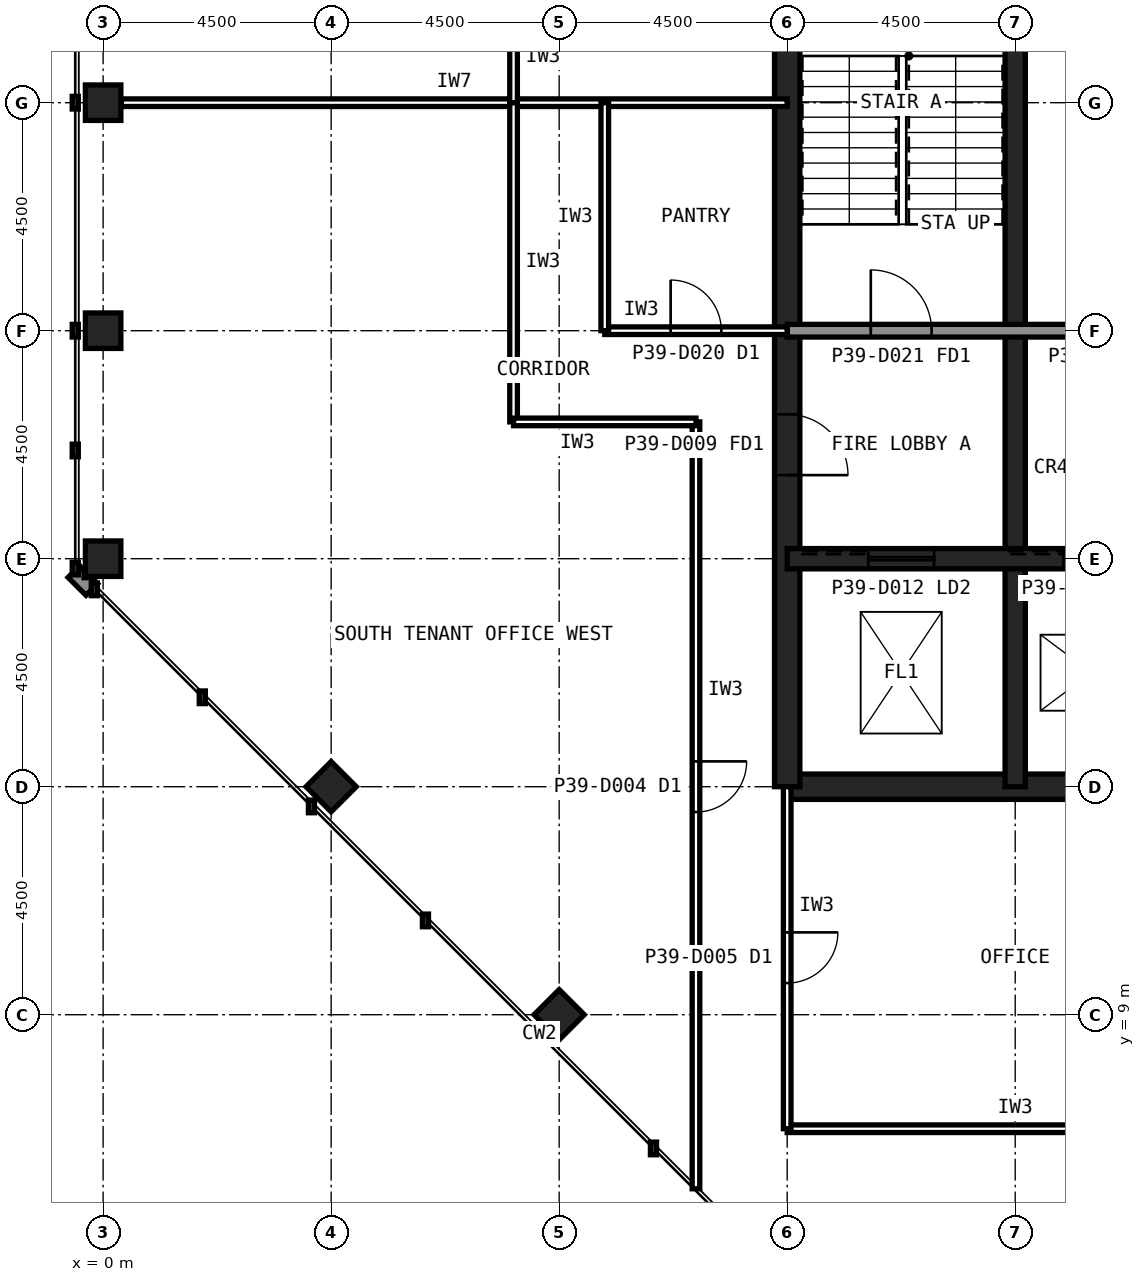
"""IFC4 building model, lengths in metres.
Left out: names, types, materials, properties, quantities, classifications, styles, units other than length and angle.
Written with IfcOpenShell. Run it as: python <this file> out.ifc"""

import sys

from ifc_helpers import new_model, si_unit, direction, frame, frame_2d, origin, origin_2d, place, context, subcontext, project, spatial, rectangle, hollow_rectangle, extrude, element, fill, save


model = new_model("IFC4")
c1 = context("Model", 3, precision=1e-05, world=origin(), true_north=direction((0.0, 1.0)))
c2 = subcontext(c1, "Body", "Model", "MODEL_VIEW")
j1 = project(units=[si_unit("LENGTHUNIT", "METRE"), si_unit("PLANEANGLEUNIT", "RADIAN")], contexts=[c1])
p1 = place(None, origin())
s1 = spatial("IfcSite", under=j1, at=p1, CompositionType="ELEMENT")
p2 = place(p1, origin())
s2 = spatial("IfcBuilding", under=s1, at=p2, CompositionType="ELEMENT")
p3 = place(p2, frame((0.0, 0.0, 167.6)))
s3 = spatial("IfcBuildingStorey", under=s2, at=p3, CompositionType="ELEMENT", Elevation=167.6)
for number, where, z_axis, x_axis in (
    (1, (0.0, 27.0, 0.0), (0.0, 0.0, 1.0), (1.0, 0.0, 0.0)),
    (2, (0.0, 22.5, 0.0), (0.0, 0.0, 1.0), (1.0, 0.0, 0.0)),
    (3, (0.0, 18.0, 0.0), (0.0, 0.0, 1.0), (1.0, 0.0, 0.0)),
    (4, (9.0, 9.0, 0.0), (0.0, 0.0, 1.0), (0.707, 0.707, 0.0)),
    (5, (4.5, 13.5, 0.0), (0.0, 0.0, 1.0), (0.707, 0.707, 0.0)),
):
    element("IfcColumn", number, at=place(p3, frame(where, z_axis=z_axis, x_axis=x_axis)), inside=s3, PredefinedType="COLUMN", context=c2, shape_type="SweptSolid", body=[
        extrude(hollow_rectangle(XDim=0.7, YDim=0.7, WallThickness=0.036, at=origin_2d()), origin(), (0.0, 0.0, 1.0), 4.0),
    ])
p4 = place(p3, frame((13.5, 13.5, 0.0), z_axis=(0.0, 0.0, 1.0), x_axis=(1.0, 0.0, 0.0)))
e6 = element("IfcWall", 6, at=p4, inside=s3, PredefinedType="SHEAR", context=c2, shape_type="SweptSolid", body=[
    extrude(rectangle(XDim=27.0, YDim=0.5, at=frame_2d((13.5, 0.0))), origin(), (0.0, 0.0, 1.0), 4.0),
])
p5 = place(p3, frame((13.5, 40.5, 0.0), z_axis=(0.0, 0.0, 1.0), x_axis=(0.0, -1.0, 0.0)))
e7 = element("IfcWall", 7, at=p5, inside=s3, PredefinedType="SHEAR", context=c2, shape_type="SweptSolid", body=[
    extrude(rectangle(XDim=27.0, YDim=0.5, at=frame_2d((13.5, 0.0))), origin(), (0.0, 0.0, 1.0), 4.0),
])
p6 = place(p5, frame((19.65, 0.0, 0.0)))
e8 = element("IfcOpeningElement", 8, at=p6, cuts=e7, PredefinedType="OPENING", context=c2, shape_type="SweptSolid", body=[
    extrude(rectangle(XDim=1.2, YDim=2.1, at=frame_2d((0.6, 1.05))), frame((0.0, 0.26, 0.0), z_axis=(0.0, -1.0, 0.0), x_axis=(1.0, 0.0, 0.0)), (0.0, 0.0, 1.0), 0.52),
])
p7 = place(p5, frame((5.85, 0.0, 0.0)))
e9 = element("IfcOpeningElement", 9, at=p7, cuts=e7, PredefinedType="OPENING", context=c2, shape_type="SweptSolid", body=[
    extrude(rectangle(XDim=1.8, YDim=2.1, at=frame_2d((0.9, 1.05))), frame((0.0, 0.26, 0.0), z_axis=(0.0, -1.0, 0.0), x_axis=(1.0, 0.0, 0.0)), (0.0, 0.0, 1.0), 0.52),
])
p8 = place(p3, frame((18.0, 13.5, 0.0), z_axis=(0.0, 0.0, 1.0), x_axis=(0.0, 1.0, 0.0)))
e10 = element("IfcWall", 10, at=p8, inside=s3, PredefinedType="SHEAR", context=c2, shape_type="SweptSolid", body=[
    extrude(rectangle(XDim=18.0, YDim=0.4, at=frame_2d((9.0, 0.0))), origin(), (0.0, 0.0, 1.0), 4.0),
])
p9 = place(p3, frame((13.5, 18.0, 0.0), z_axis=(0.0, 0.0, 1.0), x_axis=(1.0, 0.0, 0.0)))
e11 = element("IfcWall", 11, at=p9, inside=s3, PredefinedType="SHEAR", context=c2, shape_type="SweptSolid", body=[
    extrude(rectangle(XDim=27.0, YDim=0.4, at=frame_2d((13.5, 0.0))), origin(), (0.0, 0.0, 1.0), 4.0),
])
p10 = place(p9, frame((24.3, 0.0, 0.0)))
e12 = element("IfcOpeningElement", 12, at=p10, cuts=e11, PredefinedType="OPENING", context=c2, shape_type="SweptSolid", body=[
    extrude(rectangle(XDim=0.9, YDim=2.1, at=frame_2d((0.45, 1.05))), frame((0.0, 0.21, 0.0), z_axis=(0.0, -1.0, 0.0), x_axis=(1.0, 0.0, 0.0)), (0.0, 0.0, 1.0), 0.42),
])
p11 = place(p9, frame((5.45, 0.0, 0.0)))
e13 = element("IfcOpeningElement", 13, at=p11, cuts=e11, PredefinedType="OPENING", context=c2, shape_type="SweptSolid", body=[
    extrude(rectangle(XDim=1.1, YDim=2.1, at=frame_2d((0.55, 1.05))), frame((0.0, 0.21, 0.0), z_axis=(0.0, -1.0, 0.0), x_axis=(1.0, 0.0, 0.0)), (0.0, 0.0, 1.0), 0.42),
])
p12 = place(p9, frame((8.45, 0.0, 0.0)))
e14 = element("IfcOpeningElement", 14, at=p12, cuts=e11, PredefinedType="OPENING", context=c2, shape_type="SweptSolid", body=[
    extrude(rectangle(XDim=1.1, YDim=2.1, at=frame_2d((0.55, 1.05))), frame((0.0, 0.21, 0.0), z_axis=(0.0, -1.0, 0.0), x_axis=(1.0, 0.0, 0.0)), (0.0, 0.0, 1.0), 0.42),
])
p13 = place(p9, frame((11.45, 0.0, 0.0)))
e15 = element("IfcOpeningElement", 15, at=p13, cuts=e11, PredefinedType="OPENING", context=c2, shape_type="SweptSolid", body=[
    extrude(rectangle(XDim=1.1, YDim=2.1, at=frame_2d((0.55, 1.05))), frame((0.0, 0.21, 0.0), z_axis=(0.0, -1.0, 0.0), x_axis=(1.0, 0.0, 0.0)), (0.0, 0.0, 1.0), 0.42),
])
p14 = place(p9, frame((14.45, 0.0, 0.0)))
e16 = element("IfcOpeningElement", 16, at=p14, cuts=e11, PredefinedType="OPENING", context=c2, shape_type="SweptSolid", body=[
    extrude(rectangle(XDim=1.1, YDim=2.1, at=frame_2d((0.55, 1.05))), frame((0.0, 0.21, 0.0), z_axis=(0.0, -1.0, 0.0), x_axis=(1.0, 0.0, 0.0)), (0.0, 0.0, 1.0), 0.42),
])
p15 = place(p9, frame((17.45, 0.0, 0.0)))
e17 = element("IfcOpeningElement", 17, at=p15, cuts=e11, PredefinedType="OPENING", context=c2, shape_type="SweptSolid", body=[
    extrude(rectangle(XDim=1.1, YDim=2.1, at=frame_2d((0.55, 1.05))), frame((0.0, 0.21, 0.0), z_axis=(0.0, -1.0, 0.0), x_axis=(1.0, 0.0, 0.0)), (0.0, 0.0, 1.0), 0.42),
])
p16 = place(p9, frame((20.45, 0.0, 0.0)))
e18 = element("IfcOpeningElement", 18, at=p16, cuts=e11, PredefinedType="OPENING", context=c2, shape_type="SweptSolid", body=[
    extrude(rectangle(XDim=1.1, YDim=2.1, at=frame_2d((0.55, 1.05))), frame((0.0, 0.21, 0.0), z_axis=(0.0, -1.0, 0.0), x_axis=(1.0, 0.0, 0.0)), (0.0, 0.0, 1.0), 0.42),
])
p17 = place(p9, frame((1.6, 0.0, 0.0)))
e19 = element("IfcOpeningElement", 19, at=p17, cuts=e11, PredefinedType="OPENING", context=c2, shape_type="SweptSolid", body=[
    extrude(rectangle(XDim=1.3, YDim=2.2, at=frame_2d((0.65, 1.1))), frame((0.0, 0.21, 0.0), z_axis=(0.0, -1.0, 0.0), x_axis=(1.0, 0.0, 0.0)), (0.0, 0.0, 1.0), 0.42),
])
p18 = place(p3, frame((13.5, 22.5, 0.0), z_axis=(0.0, 0.0, 1.0), x_axis=(1.0, 0.0, 0.0)))
e20 = element("IfcWall", 20, at=p18, inside=s3, PredefinedType="SOLIDWALL", context=c2, shape_type="SweptSolid", body=[
    extrude(rectangle(XDim=27.0, YDim=0.25, at=frame_2d((13.5, 0.0))), origin(), (0.0, 0.0, 1.0), 3.84),
])
p19 = place(p18, frame((1.65, 0.0, 0.0)))
e21 = element("IfcOpeningElement", 21, at=p19, cuts=e20, PredefinedType="OPENING", context=c2, shape_type="SweptSolid", body=[
    extrude(rectangle(XDim=1.2, YDim=2.1, at=frame_2d((0.6, 1.05))), frame((0.0, 0.135, 0.0), z_axis=(0.0, -1.0, 0.0), x_axis=(1.0, 0.0, 0.0)), (0.0, 0.0, 1.0), 0.27),
])
p20 = place(p18, frame((6.025, 0.0, 0.0)))
e22 = element("IfcOpeningElement", 22, at=p20, cuts=e20, PredefinedType="OPENING", context=c2, shape_type="SweptSolid", body=[
    extrude(rectangle(XDim=1.0, YDim=2.1, at=frame_2d((0.5, 1.05))), frame((0.0, 0.135, 0.0), z_axis=(0.0, -1.0, 0.0), x_axis=(1.0, 0.0, 0.0)), (0.0, 0.0, 1.0), 0.27),
])
p21 = place(p18, frame((10.525, 0.0, 0.0)))
e23 = element("IfcOpeningElement", 23, at=p21, cuts=e20, PredefinedType="OPENING", context=c2, shape_type="SweptSolid", body=[
    extrude(rectangle(XDim=1.0, YDim=2.1, at=frame_2d((0.5, 1.05))), frame((0.0, 0.135, 0.0), z_axis=(0.0, -1.0, 0.0), x_axis=(1.0, 0.0, 0.0)), (0.0, 0.0, 1.0), 0.27),
])
p22 = place(p18, frame((19.75, 0.0, 0.0)))
e24 = element("IfcOpeningElement", 24, at=p22, cuts=e20, PredefinedType="OPENING", context=c2, shape_type="SweptSolid", body=[
    extrude(rectangle(XDim=1.0, YDim=2.1, at=frame_2d((0.5, 1.05))), frame((0.0, 0.135, 0.0), z_axis=(0.0, -1.0, 0.0), x_axis=(1.0, 0.0, 0.0)), (0.0, 0.0, 1.0), 0.27),
])
p23 = place(p18, frame((15.05, 0.0, 0.0)))
e25 = element("IfcOpeningElement", 25, at=p23, cuts=e20, PredefinedType="OPENING", context=c2, shape_type="SweptSolid", body=[
    extrude(rectangle(XDim=1.4, YDim=2.4, at=frame_2d((0.7, 1.2))), frame((0.0, 0.135, 0.0), z_axis=(0.0, -1.0, 0.0), x_axis=(1.0, 0.0, 0.0)), (0.0, 0.0, 1.0), 0.27),
])
p24 = place(p3, frame((0.36, 27.0, 0.0), z_axis=(0.0, 0.0, 1.0), x_axis=(1.0, 0.0, 0.0)))
e26 = element("IfcWall", 26, at=p24, inside=s3, PredefinedType="PARTITIONING", context=c2, shape_type="SweptSolid", body=[
    extrude(rectangle(XDim=13.14, YDim=0.15, at=frame_2d((6.57, 0.0))), origin(), (0.0, 0.0, 1.0), 2.989),
])
p25 = place(p3, frame((8.1, 28.8, 0.0), z_axis=(0.0, 0.0, 1.0), x_axis=(0.0, -1.0, 0.0)))
e27 = element("IfcWall", 27, at=p25, inside=s3, PredefinedType="PARTITIONING", context=c2, shape_type="SweptSolid", body=[
    extrude(rectangle(XDim=1.8, YDim=0.15, at=frame_2d((0.9, 0.0))), origin(), (0.0, 0.0, 1.0), 3.84),
])
p26 = place(p3, frame((11.7, 20.7, 0.0), z_axis=(0.0, 0.0, 1.0), x_axis=(0.0, -1.0, 0.0)))
e28 = element("IfcWall", 28, at=p26, inside=s3, PredefinedType="PARTITIONING", context=c2, shape_type="SweptSolid", body=[
    extrude(rectangle(XDim=15.135, YDim=0.15, at=frame_2d((7.568, 0.0))), origin(), (0.0, 0.0, 1.0), 3.84),
])
p27 = place(p26, frame((6.7, 0.0, 0.0)))
e29 = element("IfcOpeningElement", 29, at=p27, cuts=e28, PredefinedType="OPENING", context=c2, shape_type="SweptSolid", body=[
    extrude(rectangle(XDim=1.0, YDim=2.1, at=frame_2d((0.5, 1.05))), frame((0.0, 0.085, 0.0), z_axis=(0.0, -1.0, 0.0), x_axis=(1.0, 0.0, 0.0)), (0.0, 0.0, 1.0), 0.17),
])
p28 = place(p3, frame((8.1, 27.0, 0.0), z_axis=(0.0, 0.0, 1.0), x_axis=(0.0, -1.0, 0.0)))
e30 = element("IfcWall", 30, at=p28, inside=s3, PredefinedType="PARTITIONING", context=c2, shape_type="SweptSolid", body=[
    extrude(rectangle(XDim=6.3, YDim=0.15, at=frame_2d((3.15, 0.0))), origin(), (0.0, 0.0, 1.0), 3.84),
])
p29 = place(p3, frame((8.1, 20.7, 0.0), z_axis=(0.0, 0.0, 1.0), x_axis=(1.0, 0.0, 0.0)))
e31 = element("IfcWall", 31, at=p29, inside=s3, PredefinedType="PARTITIONING", context=c2, shape_type="SweptSolid", body=[
    extrude(rectangle(XDim=3.6, YDim=0.15, at=frame_2d((1.8, 0.0))), origin(), (0.0, 0.0, 1.0), 3.84),
])
p30 = place(p3, frame((13.5, 6.75, 0.0), z_axis=(0.0, 0.0, 1.0), x_axis=(1.0, 0.0, 0.0)))
e32 = element("IfcWall", 32, at=p30, inside=s3, PredefinedType="PARTITIONING", context=c2, shape_type="SweptSolid", body=[
    extrude(rectangle(XDim=9.0, YDim=0.15, at=frame_2d((4.5, 0.0))), origin(), (0.0, 0.0, 1.0), 3.84),
])
p31 = place(p3, frame((13.5, 13.5, 0.0), z_axis=(0.0, 0.0, 1.0), x_axis=(0.0, -1.0, 0.0)))
e33 = element("IfcWall", 33, at=p31, inside=s3, PredefinedType="PARTITIONING", context=c2, shape_type="SweptSolid", body=[
    extrude(rectangle(XDim=6.75, YDim=0.15, at=frame_2d((3.375, 0.0))), origin(), (0.0, 0.0, 1.0), 2.989),
])
p32 = place(p31, frame((2.875, 0.0, 0.0)))
e34 = element("IfcOpeningElement", 34, at=p32, cuts=e33, PredefinedType="OPENING", context=c2, shape_type="SweptSolid", body=[
    extrude(rectangle(XDim=1.0, YDim=2.1, at=frame_2d((0.5, 1.05))), frame((0.0, 0.085, 0.0), z_axis=(0.0, -1.0, 0.0), x_axis=(1.0, 0.0, 0.0)), (0.0, 0.0, 1.0), 0.17),
])
p33 = place(p3, frame((9.9, 22.5, 0.0), z_axis=(0.0, 0.0, 1.0), x_axis=(1.0, 0.0, 0.0)))
e35 = element("IfcWall", 35, at=p33, inside=s3, PredefinedType="PARTITIONING", context=c2, shape_type="SweptSolid", body=[
    extrude(rectangle(XDim=3.6, YDim=0.15, at=frame_2d((1.8, 0.0))), origin(), (0.0, 0.0, 1.0), 2.989),
])
p34 = place(p33, frame((1.3, 0.0, 0.0)))
e36 = element("IfcOpeningElement", 36, at=p34, cuts=e35, PredefinedType="OPENING", context=c2, shape_type="SweptSolid", body=[
    extrude(rectangle(XDim=1.0, YDim=2.1, at=frame_2d((0.5, 1.05))), frame((0.0, 0.085, 0.0), z_axis=(0.0, -1.0, 0.0), x_axis=(1.0, 0.0, 0.0)), (0.0, 0.0, 1.0), 0.17),
])
p35 = place(p3, frame((9.9, 27.0, 0.0), z_axis=(0.0, 0.0, 1.0), x_axis=(0.0, -1.0, 0.0)))
e37 = element("IfcWall", 37, at=p35, inside=s3, PredefinedType="PARTITIONING", context=c2, shape_type="SweptSolid", body=[
    extrude(rectangle(XDim=4.5, YDim=0.15, at=frame_2d((2.25, 0.0))), origin(), (0.0, 0.0, 1.0), 3.84),
])
p36 = place(p6, origin())
e38 = element("IfcDoor", 38, at=p36, inside=s3, OperationType="SINGLE_SWING_RIGHT", PredefinedType="DOOR", context=c2, shape_type="SweptSolid", body=[
    extrude(rectangle(XDim=1.2, YDim=2.1, at=frame_2d((0.6, 1.05))), frame((0.0, 0.025, 0.0), z_axis=(0.0, -1.0, 0.0), x_axis=(1.0, 0.0, 0.0)), (0.0, 0.0, 1.0), 0.05),
])
fill(e8, e38)
p37 = place(p19, origin())
e39 = element("IfcDoor", 39, at=p37, inside=s3, OperationType="SINGLE_SWING_LEFT", PredefinedType="DOOR", context=c2, shape_type="SweptSolid", body=[
    extrude(rectangle(XDim=1.2, YDim=2.1, at=frame_2d((0.6, 1.05))), frame((0.0, 0.025, 0.0), z_axis=(0.0, -1.0, 0.0), x_axis=(1.0, 0.0, 0.0)), (0.0, 0.0, 1.0), 0.05),
])
fill(e21, e39)
p38 = place(p11, origin())
e40 = element("IfcDoor", 40, at=p38, inside=s3, OperationType="SLIDING_TO_LEFT", PredefinedType="DOOR", context=c2, shape_type="SweptSolid", body=[
    extrude(rectangle(XDim=1.1, YDim=2.1, at=frame_2d((0.55, 1.05))), frame((0.0, 0.025, 0.0), z_axis=(0.0, -1.0, 0.0), x_axis=(1.0, 0.0, 0.0)), (0.0, 0.0, 1.0), 0.05),
])
fill(e13, e40)
p39 = place(p17, origin())
e41 = element("IfcDoor", 41, at=p39, inside=s3, OperationType="SLIDING_TO_LEFT", PredefinedType="DOOR", context=c2, shape_type="SweptSolid", body=[
    extrude(rectangle(XDim=1.3, YDim=2.2, at=frame_2d((0.65, 1.1))), frame((0.0, 0.025, 0.0), z_axis=(0.0, -1.0, 0.0), x_axis=(1.0, 0.0, 0.0)), (0.0, 0.0, 1.0), 0.05),
])
fill(e19, e41)
p40 = place(p27, origin())
e42 = element("IfcDoor", 42, at=p40, inside=s3, OperationType="SINGLE_SWING_LEFT", PredefinedType="DOOR", context=c2, shape_type="SweptSolid", body=[
    extrude(rectangle(XDim=1.0, YDim=2.1, at=frame_2d((0.5, 1.05))), frame((0.0, 0.025, 0.0), z_axis=(0.0, -1.0, 0.0), x_axis=(1.0, 0.0, 0.0)), (0.0, 0.0, 1.0), 0.05),
])
fill(e29, e42)
p41 = place(p32, origin())
e43 = element("IfcDoor", 43, at=p41, inside=s3, OperationType="SINGLE_SWING_LEFT", PredefinedType="DOOR", context=c2, shape_type="SweptSolid", body=[
    extrude(rectangle(XDim=1.0, YDim=2.1, at=frame_2d((0.5, 1.05))), frame((0.0, 0.025, 0.0), z_axis=(0.0, -1.0, 0.0), x_axis=(1.0, 0.0, 0.0)), (0.0, 0.0, 1.0), 0.05),
])
fill(e34, e43)
p42 = place(p34, origin())
e44 = element("IfcDoor", 44, at=p42, inside=s3, OperationType="SINGLE_SWING_LEFT", PredefinedType="DOOR", context=c2, shape_type="SweptSolid", body=[
    extrude(rectangle(XDim=1.0, YDim=2.1, at=frame_2d((0.5, 1.05))), frame((0.0, 0.025, 0.0), z_axis=(0.0, -1.0, 0.0), x_axis=(1.0, 0.0, 0.0)), (0.0, 0.0, 1.0), 0.05),
])
fill(e36, e44)
save(model, sys.argv[1])
